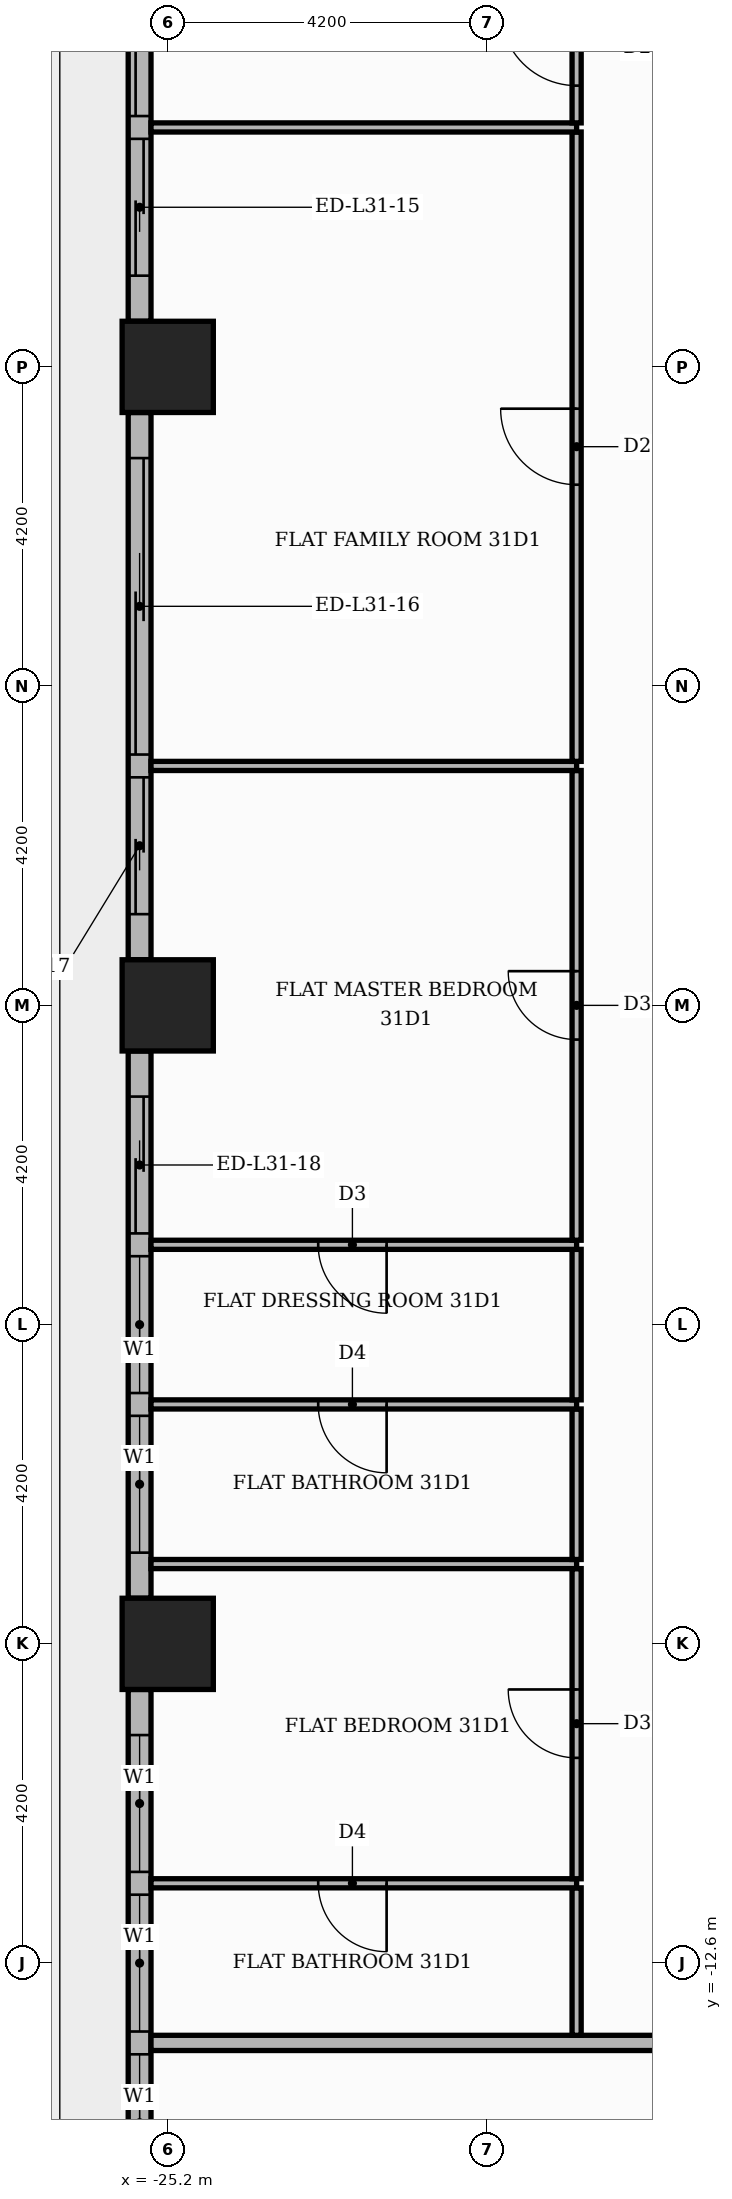
"""IFC4 building model, lengths in metres.
Left out: names, types, materials, properties, quantities, classifications, styles, units other than length and angle.
Written with IfcOpenShell. Run it as: python <this file> out.ifc"""

import sys

from ifc_helpers import new_model, si_unit, direction, frame, frame_2d, origin, origin_2d, place, context, subcontext, project, spatial, rectangle, extrude, element, fill, save


model = new_model("IFC4")
c1 = context("Model", 3, precision=1e-05, world=origin(), true_north=direction((0.0, 1.0)))
c2 = subcontext(c1, "Body", "Model", "MODEL_VIEW")
j1 = project(units=[si_unit("LENGTHUNIT", "METRE"), si_unit("PLANEANGLEUNIT", "RADIAN")], contexts=[c1])
p1 = place(None, origin())
s1 = spatial("IfcSite", under=j1, at=p1, CompositionType="ELEMENT")
p2 = place(p1, origin())
s2 = spatial("IfcBuilding", under=s1, at=p2, CompositionType="ELEMENT")
p3 = place(p2, frame((0.0, 0.0, 133.8)))
s3 = spatial("IfcBuildingStorey", under=s2, at=p3, CompositionType="ELEMENT", Elevation=133.8)
for number, where, z_axis, x_axis in (
    (1, (-25.2, 0.0, -0.42), (0.0, 0.0, 1.0), (1.0, 0.0, 0.0)),
    (2, (-25.2, -8.4, -0.42), (0.0, 0.0, 1.0), (1.0, 0.0, 0.0)),
    (3, (-25.2, 8.4, -0.42), (0.0, 0.0, 1.0), (1.0, 0.0, 0.0)),
):
    element("IfcColumn", number, at=place(p3, frame(where, z_axis=z_axis, x_axis=x_axis)), inside=s3, PredefinedType="COLUMN", context=c2, shape_type="SweptSolid", body=[
        extrude(rectangle(XDim=1.2, YDim=1.2, at=origin_2d()), origin(), (0.0, 0.0, 1.0), 4.32),
    ])
p4 = place(p3, frame((-25.57, 16.2, 0.0), z_axis=(0.0, 0.0, 1.0), x_axis=(0.0, -1.0, 0.0)))
e4 = element("IfcWall", 4, at=p4, inside=s3, PredefinedType="STANDARD", context=c2, shape_type="SweptSolid", body=[
    extrude(rectangle(XDim=7.2, YDim=0.3, at=frame_2d((3.6, 0.0))), origin(), (0.0, 0.0, 1.0), 3.48),
])
p5 = place(p4, frame((0.6, 0.0, 0.0)))
e5 = element("IfcOpeningElement", 5, at=p5, cuts=e4, PredefinedType="OPENING", context=c2, shape_type="SweptSolid", body=[
    extrude(rectangle(XDim=3.9, YDim=2.4, at=frame_2d((1.95, 1.2))), frame((0.0, 0.16, 0.0), z_axis=(0.0, -1.0, 0.0), x_axis=(1.0, 0.0, 0.0)), (0.0, 0.0, 1.0), 0.32),
])
p6 = place(p4, frame((4.8, 0.0, 0.0)))
e6 = element("IfcOpeningElement", 6, at=p6, cuts=e4, PredefinedType="OPENING", context=c2, shape_type="SweptSolid", body=[
    extrude(rectangle(XDim=1.8, YDim=2.4, at=frame_2d((0.9, 1.2))), frame((0.0, 0.16, 0.0), z_axis=(0.0, -1.0, 0.0), x_axis=(1.0, 0.0, 0.0)), (0.0, 0.0, 1.0), 0.32),
])
p7 = place(p3, frame((-25.57, 7.8, 0.0), z_axis=(0.0, 0.0, 1.0), x_axis=(0.0, -1.0, 0.0)))
e7 = element("IfcWall", 7, at=p7, inside=s3, PredefinedType="STANDARD", context=c2, shape_type="SweptSolid", body=[
    extrude(rectangle(XDim=7.2, YDim=0.3, at=frame_2d((3.6, 0.0))), origin(), (0.0, 0.0, 1.0), 3.48),
])
p8 = place(p7, frame((0.6, 0.0, 0.0)))
e8 = element("IfcOpeningElement", 8, at=p8, cuts=e7, PredefinedType="OPENING", context=c2, shape_type="SweptSolid", body=[
    extrude(rectangle(XDim=3.9, YDim=2.4, at=frame_2d((1.95, 1.2))), frame((0.0, 0.16, 0.0), z_axis=(0.0, -1.0, 0.0), x_axis=(1.0, 0.0, 0.0)), (0.0, 0.0, 1.0), 0.32),
])
p9 = place(p7, frame((4.8, 0.0, 0.0)))
e9 = element("IfcOpeningElement", 9, at=p9, cuts=e7, PredefinedType="OPENING", context=c2, shape_type="SweptSolid", body=[
    extrude(rectangle(XDim=1.8, YDim=2.4, at=frame_2d((0.9, 1.2))), frame((0.0, 0.16, 0.0), z_axis=(0.0, -1.0, 0.0), x_axis=(1.0, 0.0, 0.0)), (0.0, 0.0, 1.0), 0.32),
])
p10 = place(p3, frame((-25.57, -0.6, 0.0), z_axis=(0.0, 0.0, 1.0), x_axis=(0.0, -1.0, 0.0)))
e10 = element("IfcWall", 10, at=p10, inside=s3, PredefinedType="STANDARD", context=c2, shape_type="SweptSolid", body=[
    extrude(rectangle(XDim=7.2, YDim=0.3, at=frame_2d((3.6, 0.0))), origin(), (0.0, 0.0, 1.0), 3.48),
])
p11 = place(p10, frame((0.6, 0.0, 0.0)))
e11 = element("IfcOpeningElement", 11, at=p11, cuts=e10, PredefinedType="OPENING", context=c2, shape_type="SweptSolid", body=[
    extrude(rectangle(XDim=1.8, YDim=2.4, at=frame_2d((0.9, 1.2))), frame((0.0, 0.16, 0.0), z_axis=(0.0, -1.0, 0.0), x_axis=(1.0, 0.0, 0.0)), (0.0, 0.0, 1.0), 0.32),
])
p12 = place(p10, frame((2.7, 0.0, 0.9)))
e12 = element("IfcOpeningElement", 12, at=p12, cuts=e10, PredefinedType="OPENING", context=c2, shape_type="SweptSolid", body=[
    extrude(rectangle(XDim=1.8, YDim=2.1, at=frame_2d((0.9, 1.05))), frame((0.0, 0.16, 0.0), z_axis=(0.0, -1.0, 0.0), x_axis=(1.0, 0.0, 0.0)), (0.0, 0.0, 1.0), 0.32),
])
p13 = place(p10, frame((4.8, 0.0, 0.9)))
e13 = element("IfcOpeningElement", 13, at=p13, cuts=e10, PredefinedType="OPENING", context=c2, shape_type="SweptSolid", body=[
    extrude(rectangle(XDim=1.8, YDim=2.1, at=frame_2d((0.9, 1.05))), frame((0.0, 0.16, 0.0), z_axis=(0.0, -1.0, 0.0), x_axis=(1.0, 0.0, 0.0)), (0.0, 0.0, 1.0), 0.32),
])
p14 = place(p3, frame((-25.57, -9.0, 0.0), z_axis=(0.0, 0.0, 1.0), x_axis=(0.0, -1.0, 0.0)))
e14 = element("IfcWall", 14, at=p14, inside=s3, PredefinedType="STANDARD", context=c2, shape_type="SweptSolid", body=[
    extrude(rectangle(XDim=7.2, YDim=0.3, at=frame_2d((3.6, 0.0))), origin(), (0.0, 0.0, 1.0), 3.48),
])
p15 = place(p14, frame((0.6, 0.0, 0.9)))
e15 = element("IfcOpeningElement", 15, at=p15, cuts=e14, PredefinedType="OPENING", context=c2, shape_type="SweptSolid", body=[
    extrude(rectangle(XDim=1.8, YDim=2.1, at=frame_2d((0.9, 1.05))), frame((0.0, 0.16, 0.0), z_axis=(0.0, -1.0, 0.0), x_axis=(1.0, 0.0, 0.0)), (0.0, 0.0, 1.0), 0.32),
])
p16 = place(p14, frame((2.7, 0.0, 0.9)))
e16 = element("IfcOpeningElement", 16, at=p16, cuts=e14, PredefinedType="OPENING", context=c2, shape_type="SweptSolid", body=[
    extrude(rectangle(XDim=1.8, YDim=2.1, at=frame_2d((0.9, 1.05))), frame((0.0, 0.16, 0.0), z_axis=(0.0, -1.0, 0.0), x_axis=(1.0, 0.0, 0.0)), (0.0, 0.0, 1.0), 0.32),
])
p17 = place(p14, frame((4.8, 0.0, 0.9)))
e17 = element("IfcOpeningElement", 17, at=p17, cuts=e14, PredefinedType="OPENING", context=c2, shape_type="SweptSolid", body=[
    extrude(rectangle(XDim=1.8, YDim=2.1, at=frame_2d((0.9, 1.05))), frame((0.0, 0.16, 0.0), z_axis=(0.0, -1.0, 0.0), x_axis=(1.0, 0.0, 0.0)), (0.0, 0.0, 1.0), 0.32),
])
p18 = place(p3, frame((-25.42, -13.65, 0.0), z_axis=(0.0, 0.0, 1.0), x_axis=(1.0, 0.0, 0.0)))
e18 = element("IfcWall", 18, at=p18, inside=s3, PredefinedType="PARTITIONING", context=c2, shape_type="SweptSolid", body=[
    extrude(rectangle(XDim=39.07, YDim=0.2, at=frame_2d((19.535, 0.0))), origin(), (0.0, 0.0, 1.0), 3.48),
])
p19 = place(p18, frame((13.32, 0.0, 0.0)))
e19 = element("IfcOpeningElement", 19, at=p19, cuts=e18, PredefinedType="OPENING", context=c2, shape_type="SweptSolid", body=[
    extrude(rectangle(XDim=1.1, YDim=2.4, at=frame_2d((0.55, 1.2))), frame((0.0, 0.11, 0.0), z_axis=(0.0, -1.0, 0.0), x_axis=(1.0, 0.0, 0.0)), (0.0, 0.0, 1.0), 0.22),
])
p20 = place(p18, frame((25.92, 0.0, 0.0)))
e20 = element("IfcOpeningElement", 20, at=p20, cuts=e18, PredefinedType="OPENING", context=c2, shape_type="SweptSolid", body=[
    extrude(rectangle(XDim=1.1, YDim=2.4, at=frame_2d((0.55, 1.2))), frame((0.0, 0.11, 0.0), z_axis=(0.0, -1.0, 0.0), x_axis=(1.0, 0.0, 0.0)), (0.0, 0.0, 1.0), 0.22),
])
p21 = place(p3, frame((-19.82, -13.55, 0.0), z_axis=(0.0, 0.0, 1.0), x_axis=(0.0, 1.0, 0.0)))
e21 = element("IfcWall", 21, at=p21, inside=s3, PredefinedType="PARTITIONING", context=c2, shape_type="SweptSolid", body=[
    extrude(rectangle(XDim=1.94, YDim=0.12, at=frame_2d((0.97, 0.0))), origin(), (0.0, 0.0, 1.0), 3.48),
])
p22 = place(p3, frame((-25.42, -11.55, 0.0), z_axis=(0.0, 0.0, 1.0), x_axis=(1.0, 0.0, 0.0)))
e22 = element("IfcWall", 22, at=p22, inside=s3, PredefinedType="PARTITIONING", context=c2, shape_type="SweptSolid", body=[
    extrude(rectangle(XDim=5.6, YDim=0.12, at=frame_2d((2.8, 0.0))), origin(), (0.0, 0.0, 1.0), 3.48),
])
p23 = place(p22, frame((2.2, 0.0, 0.0)))
e23 = element("IfcOpeningElement", 23, at=p23, cuts=e22, PredefinedType="OPENING", context=c2, shape_type="SweptSolid", body=[
    extrude(rectangle(XDim=0.9, YDim=2.1, at=frame_2d((0.45, 1.05))), frame((0.0, 0.07, 0.0), z_axis=(0.0, -1.0, 0.0), x_axis=(1.0, 0.0, 0.0)), (0.0, 0.0, 1.0), 0.14),
])
p24 = place(p3, frame((-19.82, -11.49, 0.0), z_axis=(0.0, 0.0, 1.0), x_axis=(0.0, 1.0, 0.0)))
e24 = element("IfcWall", 24, at=p24, inside=s3, PredefinedType="PARTITIONING", context=c2, shape_type="SweptSolid", body=[
    extrude(rectangle(XDim=4.08, YDim=0.12, at=frame_2d((2.04, 0.0))), origin(), (0.0, 0.0, 1.0), 3.48),
])
p25 = place(p24, frame((1.59, 0.0, 0.0)))
e25 = element("IfcOpeningElement", 25, at=p25, cuts=e24, PredefinedType="OPENING", context=c2, shape_type="SweptSolid", body=[
    extrude(rectangle(XDim=0.9, YDim=2.1, at=frame_2d((0.45, 1.05))), frame((0.0, 0.07, 0.0), z_axis=(0.0, -1.0, 0.0), x_axis=(1.0, 0.0, 0.0)), (0.0, 0.0, 1.0), 0.14),
])
p26 = place(p3, frame((-25.42, -7.35, 0.0), z_axis=(0.0, 0.0, 1.0), x_axis=(1.0, 0.0, 0.0)))
e26 = element("IfcWall", 26, at=p26, inside=s3, PredefinedType="PARTITIONING", context=c2, shape_type="SweptSolid", body=[
    extrude(rectangle(XDim=5.6, YDim=0.12, at=frame_2d((2.8, 0.0))), origin(), (0.0, 0.0, 1.0), 3.48),
])
p27 = place(p3, frame((-19.82, -7.29, 0.0), z_axis=(0.0, 0.0, 1.0), x_axis=(0.0, 1.0, 0.0)))
e27 = element("IfcWall", 27, at=p27, inside=s3, PredefinedType="PARTITIONING", context=c2, shape_type="SweptSolid", body=[
    extrude(rectangle(XDim=1.98, YDim=0.12, at=frame_2d((0.99, 0.0))), origin(), (0.0, 0.0, 1.0), 3.48),
])
p28 = place(p3, frame((-25.42, -5.25, 0.0), z_axis=(0.0, 0.0, 1.0), x_axis=(1.0, 0.0, 0.0)))
e28 = element("IfcWall", 28, at=p28, inside=s3, PredefinedType="PARTITIONING", context=c2, shape_type="SweptSolid", body=[
    extrude(rectangle(XDim=5.6, YDim=0.12, at=frame_2d((2.8, 0.0))), origin(), (0.0, 0.0, 1.0), 3.48),
])
p29 = place(p28, frame((2.2, 0.0, 0.0)))
e29 = element("IfcOpeningElement", 29, at=p29, cuts=e28, PredefinedType="OPENING", context=c2, shape_type="SweptSolid", body=[
    extrude(rectangle(XDim=0.9, YDim=2.1, at=frame_2d((0.45, 1.05))), frame((0.0, 0.07, 0.0), z_axis=(0.0, -1.0, 0.0), x_axis=(1.0, 0.0, 0.0)), (0.0, 0.0, 1.0), 0.14),
])
p30 = place(p3, frame((-19.82, -5.19, 0.0), z_axis=(0.0, 0.0, 1.0), x_axis=(0.0, 1.0, 0.0)))
e30 = element("IfcWall", 30, at=p30, inside=s3, PredefinedType="PARTITIONING", context=c2, shape_type="SweptSolid", body=[
    extrude(rectangle(XDim=1.98, YDim=0.12, at=frame_2d((0.99, 0.0))), origin(), (0.0, 0.0, 1.0), 3.48),
])
p31 = place(p3, frame((-25.42, -3.15, 0.0), z_axis=(0.0, 0.0, 1.0), x_axis=(1.0, 0.0, 0.0)))
e31 = element("IfcWall", 31, at=p31, inside=s3, PredefinedType="PARTITIONING", context=c2, shape_type="SweptSolid", body=[
    extrude(rectangle(XDim=5.6, YDim=0.12, at=frame_2d((2.8, 0.0))), origin(), (0.0, 0.0, 1.0), 3.48),
])
p32 = place(p31, frame((2.2, 0.0, 0.0)))
e32 = element("IfcOpeningElement", 32, at=p32, cuts=e31, PredefinedType="OPENING", context=c2, shape_type="SweptSolid", body=[
    extrude(rectangle(XDim=0.9, YDim=2.1, at=frame_2d((0.45, 1.05))), frame((0.0, 0.07, 0.0), z_axis=(0.0, -1.0, 0.0), x_axis=(1.0, 0.0, 0.0)), (0.0, 0.0, 1.0), 0.14),
])
p33 = place(p3, frame((-19.82, -3.09, 0.0), z_axis=(0.0, 0.0, 1.0), x_axis=(0.0, 1.0, 0.0)))
e33 = element("IfcWall", 33, at=p33, inside=s3, PredefinedType="PARTITIONING", context=c2, shape_type="SweptSolid", body=[
    extrude(rectangle(XDim=6.18, YDim=0.12, at=frame_2d((3.09, 0.0))), origin(), (0.0, 0.0, 1.0), 3.48),
])
p34 = place(p33, frame((2.64, 0.0, 0.0)))
e34 = element("IfcOpeningElement", 34, at=p34, cuts=e33, PredefinedType="OPENING", context=c2, shape_type="SweptSolid", body=[
    extrude(rectangle(XDim=0.9, YDim=2.1, at=frame_2d((0.45, 1.05))), frame((0.0, 0.07, 0.0), z_axis=(0.0, -1.0, 0.0), x_axis=(1.0, 0.0, 0.0)), (0.0, 0.0, 1.0), 0.14),
])
p35 = place(p3, frame((-25.42, 3.15, 0.0), z_axis=(0.0, 0.0, 1.0), x_axis=(1.0, 0.0, 0.0)))
e35 = element("IfcWall", 35, at=p35, inside=s3, PredefinedType="PARTITIONING", context=c2, shape_type="SweptSolid", body=[
    extrude(rectangle(XDim=5.6, YDim=0.12, at=frame_2d((2.8, 0.0))), origin(), (0.0, 0.0, 1.0), 3.48),
])
p36 = place(p3, frame((-19.82, 3.21, 0.0), z_axis=(0.0, 0.0, 1.0), x_axis=(0.0, 1.0, 0.0)))
e36 = element("IfcWall", 36, at=p36, inside=s3, PredefinedType="PARTITIONING", context=c2, shape_type="SweptSolid", body=[
    extrude(rectangle(XDim=8.28, YDim=0.12, at=frame_2d((4.14, 0.0))), origin(), (0.0, 0.0, 1.0), 3.48),
])
p37 = place(p36, frame((3.64, 0.0, 0.0)))
e37 = element("IfcOpeningElement", 37, at=p37, cuts=e36, PredefinedType="OPENING", context=c2, shape_type="SweptSolid", body=[
    extrude(rectangle(XDim=1.0, YDim=2.1, at=frame_2d((0.5, 1.05))), frame((0.0, 0.07, 0.0), z_axis=(0.0, -1.0, 0.0), x_axis=(1.0, 0.0, 0.0)), (0.0, 0.0, 1.0), 0.14),
])
p38 = place(p3, frame((-25.42, 11.55, 0.0), z_axis=(0.0, 0.0, 1.0), x_axis=(1.0, 0.0, 0.0)))
e38 = element("IfcWall", 38, at=p38, inside=s3, PredefinedType="PARTITIONING", context=c2, shape_type="SweptSolid", body=[
    extrude(rectangle(XDim=5.6, YDim=0.12, at=frame_2d((2.8, 0.0))), origin(), (0.0, 0.0, 1.0), 3.48),
])
p39 = place(p3, frame((-19.82, 11.61, 0.0), z_axis=(0.0, 0.0, 1.0), x_axis=(0.0, 1.0, 0.0)))
e39 = element("IfcWall", 39, at=p39, inside=s3, PredefinedType="PARTITIONING", context=c2, shape_type="SweptSolid", body=[
    extrude(rectangle(XDim=1.98, YDim=0.12, at=frame_2d((0.99, 0.0))), origin(), (0.0, 0.0, 1.0), 3.48),
])
p40 = place(p39, frame((0.49, 0.0, 0.0)))
e40 = element("IfcOpeningElement", 40, at=p40, cuts=e39, PredefinedType="OPENING", context=c2, shape_type="SweptSolid", body=[
    extrude(rectangle(XDim=1.0, YDim=2.1, at=frame_2d((0.5, 1.05))), frame((0.0, 0.07, 0.0), z_axis=(0.0, -1.0, 0.0), x_axis=(1.0, 0.0, 0.0)), (0.0, 0.0, 1.0), 0.14),
])
p41 = place(p5, origin())
e41 = element("IfcDoor", 41, at=p41, inside=s3, OperationType="SLIDING_TO_LEFT", PredefinedType="DOOR", context=c2, shape_type="SweptSolid", body=[
    extrude(rectangle(XDim=3.9, YDim=2.4, at=frame_2d((1.95, 1.2))), frame((0.0, 0.025, 0.0), z_axis=(0.0, -1.0, 0.0), x_axis=(1.0, 0.0, 0.0)), (0.0, 0.0, 1.0), 0.05),
])
fill(e5, e41)
p42 = place(p6, origin())
e42 = element("IfcDoor", 42, at=p42, inside=s3, OperationType="SLIDING_TO_RIGHT", PredefinedType="DOOR", context=c2, shape_type="SweptSolid", body=[
    extrude(rectangle(XDim=1.8, YDim=2.4, at=frame_2d((0.9, 1.2))), frame((0.0, 0.025, 0.0), z_axis=(0.0, -1.0, 0.0), x_axis=(1.0, 0.0, 0.0)), (0.0, 0.0, 1.0), 0.05),
])
fill(e6, e42)
p43 = place(p8, origin())
e43 = element("IfcDoor", 43, at=p43, inside=s3, OperationType="SLIDING_TO_LEFT", PredefinedType="DOOR", context=c2, shape_type="SweptSolid", body=[
    extrude(rectangle(XDim=3.9, YDim=2.4, at=frame_2d((1.95, 1.2))), frame((0.0, 0.025, 0.0), z_axis=(0.0, -1.0, 0.0), x_axis=(1.0, 0.0, 0.0)), (0.0, 0.0, 1.0), 0.05),
])
fill(e8, e43)
p44 = place(p9, origin())
e44 = element("IfcDoor", 44, at=p44, inside=s3, OperationType="SLIDING_TO_RIGHT", PredefinedType="DOOR", context=c2, shape_type="SweptSolid", body=[
    extrude(rectangle(XDim=1.8, YDim=2.4, at=frame_2d((0.9, 1.2))), frame((0.0, 0.025, 0.0), z_axis=(0.0, -1.0, 0.0), x_axis=(1.0, 0.0, 0.0)), (0.0, 0.0, 1.0), 0.05),
])
fill(e9, e44)
p45 = place(p11, origin())
e45 = element("IfcDoor", 45, at=p45, inside=s3, OperationType="SLIDING_TO_LEFT", PredefinedType="DOOR", context=c2, shape_type="SweptSolid", body=[
    extrude(rectangle(XDim=1.8, YDim=2.4, at=frame_2d((0.9, 1.2))), frame((0.0, 0.025, 0.0), z_axis=(0.0, -1.0, 0.0), x_axis=(1.0, 0.0, 0.0)), (0.0, 0.0, 1.0), 0.05),
])
fill(e11, e45)
p46 = place(p12, origin())
e46 = element("IfcWindow", 46, at=p46, inside=s3, PartitioningType="SINGLE_PANEL", PredefinedType="WINDOW", context=c2, shape_type="SweptSolid", body=[
    extrude(rectangle(XDim=1.8, YDim=2.1, at=frame_2d((0.9, 1.05))), frame((0.0, 0.03, 0.0), z_axis=(0.0, -1.0, 0.0), x_axis=(1.0, 0.0, 0.0)), (0.0, 0.0, 1.0), 0.06),
])
fill(e12, e46)
p47 = place(p13, origin())
e47 = element("IfcWindow", 47, at=p47, inside=s3, PartitioningType="SINGLE_PANEL", PredefinedType="WINDOW", context=c2, shape_type="SweptSolid", body=[
    extrude(rectangle(XDim=1.8, YDim=2.1, at=frame_2d((0.9, 1.05))), frame((0.0, 0.03, 0.0), z_axis=(0.0, -1.0, 0.0), x_axis=(1.0, 0.0, 0.0)), (0.0, 0.0, 1.0), 0.06),
])
fill(e13, e47)
p48 = place(p15, origin())
e48 = element("IfcWindow", 48, at=p48, inside=s3, PartitioningType="SINGLE_PANEL", PredefinedType="WINDOW", context=c2, shape_type="SweptSolid", body=[
    extrude(rectangle(XDim=1.8, YDim=2.1, at=frame_2d((0.9, 1.05))), frame((0.0, 0.03, 0.0), z_axis=(0.0, -1.0, 0.0), x_axis=(1.0, 0.0, 0.0)), (0.0, 0.0, 1.0), 0.06),
])
fill(e15, e48)
p49 = place(p16, origin())
e49 = element("IfcWindow", 49, at=p49, inside=s3, PartitioningType="SINGLE_PANEL", PredefinedType="WINDOW", context=c2, shape_type="SweptSolid", body=[
    extrude(rectangle(XDim=1.8, YDim=2.1, at=frame_2d((0.9, 1.05))), frame((0.0, 0.03, 0.0), z_axis=(0.0, -1.0, 0.0), x_axis=(1.0, 0.0, 0.0)), (0.0, 0.0, 1.0), 0.06),
])
fill(e16, e49)
p50 = place(p17, origin())
e50 = element("IfcWindow", 50, at=p50, inside=s3, PartitioningType="SINGLE_PANEL", PredefinedType="WINDOW", context=c2, shape_type="SweptSolid", body=[
    extrude(rectangle(XDim=1.8, YDim=2.1, at=frame_2d((0.9, 1.05))), frame((0.0, 0.03, 0.0), z_axis=(0.0, -1.0, 0.0), x_axis=(1.0, 0.0, 0.0)), (0.0, 0.0, 1.0), 0.06),
])
fill(e17, e50)
p51 = place(p40, origin())
e51 = element("IfcDoor", 51, at=p51, inside=s3, OperationType="SINGLE_SWING_RIGHT", PredefinedType="DOOR", context=c2, shape_type="SweptSolid", body=[
    extrude(rectangle(XDim=1.0, YDim=2.1, at=frame_2d((0.5, 1.05))), frame((0.0, 0.025, 0.0), z_axis=(0.0, -1.0, 0.0), x_axis=(1.0, 0.0, 0.0)), (0.0, 0.0, 1.0), 0.05),
])
fill(e40, e51)
p52 = place(p37, origin())
e52 = element("IfcDoor", 52, at=p52, inside=s3, OperationType="SINGLE_SWING_RIGHT", PredefinedType="DOOR", context=c2, shape_type="SweptSolid", body=[
    extrude(rectangle(XDim=1.0, YDim=2.1, at=frame_2d((0.5, 1.05))), frame((0.0, 0.025, 0.0), z_axis=(0.0, -1.0, 0.0), x_axis=(1.0, 0.0, 0.0)), (0.0, 0.0, 1.0), 0.05),
])
fill(e37, e52)
p53 = place(p34, origin())
e53 = element("IfcDoor", 53, at=p53, inside=s3, OperationType="SINGLE_SWING_RIGHT", PredefinedType="DOOR", context=c2, shape_type="SweptSolid", body=[
    extrude(rectangle(XDim=0.9, YDim=2.1, at=frame_2d((0.45, 1.05))), frame((0.0, 0.025, 0.0), z_axis=(0.0, -1.0, 0.0), x_axis=(1.0, 0.0, 0.0)), (0.0, 0.0, 1.0), 0.05),
])
fill(e34, e53)
p54 = place(p32, frame((0.9, 0.0, 0.0), z_axis=(0.0, 0.0, 1.0), x_axis=(-1.0, 0.0, 0.0)))
e54 = element("IfcDoor", 54, at=p54, inside=s3, OperationType="SINGLE_SWING_RIGHT", PredefinedType="DOOR", context=c2, shape_type="SweptSolid", body=[
    extrude(rectangle(XDim=0.9, YDim=2.1, at=frame_2d((0.45, 1.05))), frame((0.0, 0.025, 0.0), z_axis=(0.0, -1.0, 0.0), x_axis=(1.0, 0.0, 0.0)), (0.0, 0.0, 1.0), 0.05),
])
fill(e32, e54)
p55 = place(p29, frame((0.9, 0.0, 0.0), z_axis=(0.0, 0.0, 1.0), x_axis=(-1.0, 0.0, 0.0)))
e55 = element("IfcDoor", 55, at=p55, inside=s3, OperationType="SINGLE_SWING_RIGHT", PredefinedType="DOOR", context=c2, shape_type="SweptSolid", body=[
    extrude(rectangle(XDim=0.9, YDim=2.1, at=frame_2d((0.45, 1.05))), frame((0.0, 0.025, 0.0), z_axis=(0.0, -1.0, 0.0), x_axis=(1.0, 0.0, 0.0)), (0.0, 0.0, 1.0), 0.05),
])
fill(e29, e55)
p56 = place(p25, origin())
e56 = element("IfcDoor", 56, at=p56, inside=s3, OperationType="SINGLE_SWING_RIGHT", PredefinedType="DOOR", context=c2, shape_type="SweptSolid", body=[
    extrude(rectangle(XDim=0.9, YDim=2.1, at=frame_2d((0.45, 1.05))), frame((0.0, 0.025, 0.0), z_axis=(0.0, -1.0, 0.0), x_axis=(1.0, 0.0, 0.0)), (0.0, 0.0, 1.0), 0.05),
])
fill(e25, e56)
p57 = place(p23, frame((0.9, 0.0, 0.0), z_axis=(0.0, 0.0, 1.0), x_axis=(-1.0, 0.0, 0.0)))
e57 = element("IfcDoor", 57, at=p57, inside=s3, OperationType="SINGLE_SWING_RIGHT", PredefinedType="DOOR", context=c2, shape_type="SweptSolid", body=[
    extrude(rectangle(XDim=0.9, YDim=2.1, at=frame_2d((0.45, 1.05))), frame((0.0, 0.025, 0.0), z_axis=(0.0, -1.0, 0.0), x_axis=(1.0, 0.0, 0.0)), (0.0, 0.0, 1.0), 0.05),
])
fill(e23, e57)
save(model, sys.argv[1])
